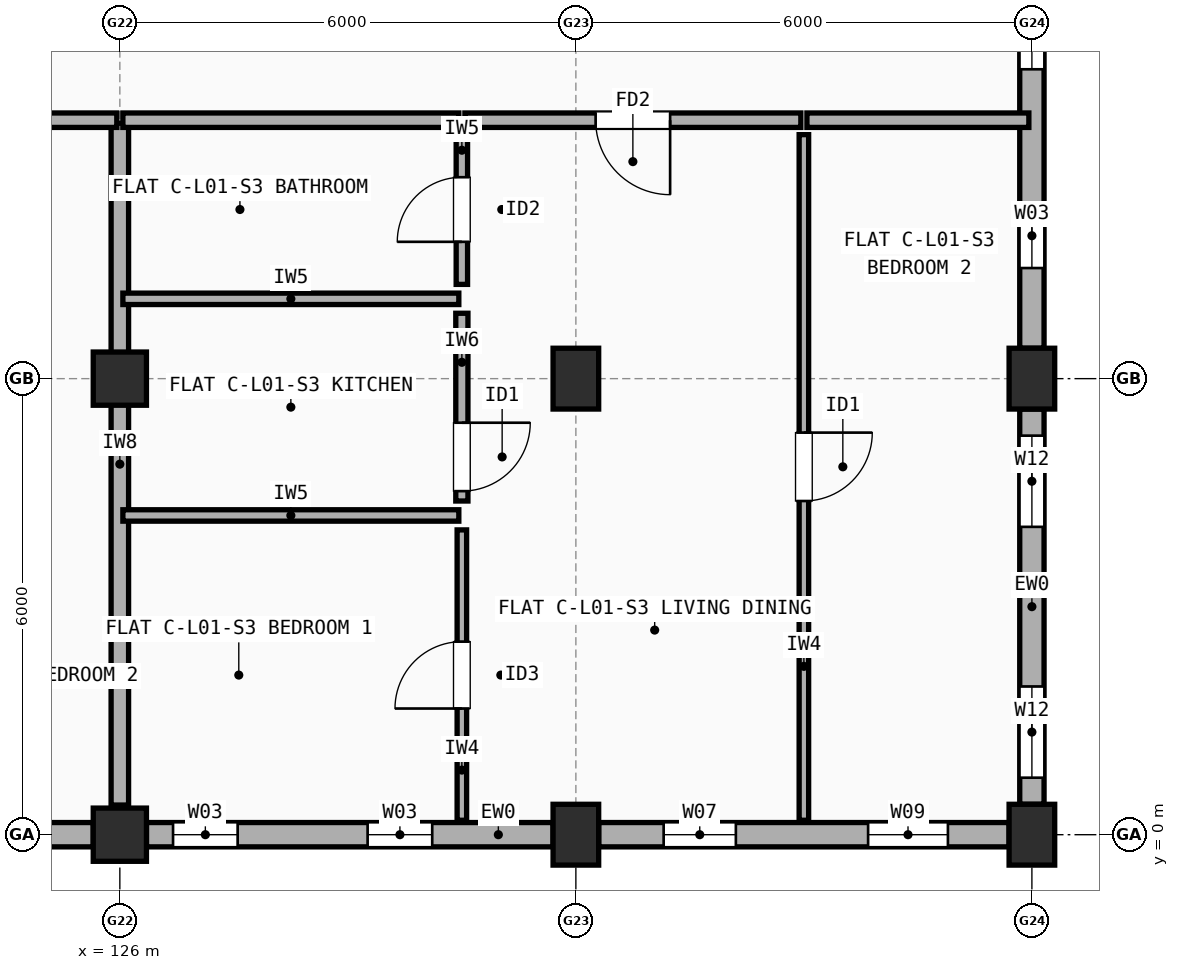
"""IFC4 building model, lengths in metres.
Left out: names, types, materials, properties, quantities, classifications, styles, units other than length and angle.
Written with IfcOpenShell. Run it as: python <this file> out.ifc"""

import sys

from ifc_helpers import new_model, si_unit, direction, frame, frame_2d, origin, origin_2d, place, context, subcontext, project, spatial, rectangle, extrude, element, fill, save


model = new_model("IFC4")
c1 = context("Model", 3, precision=1e-05, world=origin(), true_north=direction((0.0, 1.0)))
c2 = subcontext(c1, "Body", "Model", "MODEL_VIEW")
j1 = project(units=[si_unit("LENGTHUNIT", "METRE"), si_unit("PLANEANGLEUNIT", "RADIAN")], contexts=[c1])
p1 = place(None, origin())
s1 = spatial("IfcSite", under=j1, at=p1, CompositionType="ELEMENT")
p2 = place(p1, origin())
s2 = spatial("IfcBuilding", under=s1, at=p2, CompositionType="ELEMENT")
p3 = place(p2, frame((0.0, 0.0, 4.5)))
s3 = spatial("IfcBuildingStorey", under=s2, at=p3, CompositionType="ELEMENT", Elevation=4.5)
for number, where, z_axis, x_axis in (
    (1, (126.0, 0.0, 0.0), (0.0, 0.0, 1.0), (1.0, 0.0, 0.0)),
    (2, (126.0, 6.0, 0.0), (0.0, 0.0, 1.0), (1.0, 0.0, 0.0)),
):
    element("IfcColumn", number, at=place(p3, frame(where, z_axis=z_axis, x_axis=x_axis)), inside=s3, PredefinedType="COLUMN", context=c2, shape_type="SweptSolid", body=[
        extrude(rectangle(XDim=0.7, YDim=0.7, at=origin_2d()), origin(), (0.0, 0.0, 1.0), 2.945),
    ])
for number, where, z_axis, x_axis in (
    (3, (132.0, 0.0, 0.0), (0.0, 0.0, 1.0), (1.0, 0.0, 0.0)),
    (4, (132.0, 6.0, 0.0), (0.0, 0.0, 1.0), (1.0, 0.0, 0.0)),
    (5, (138.0, 0.0, 0.0), (0.0, 0.0, 1.0), (1.0, 0.0, 0.0)),
    (6, (138.0, 6.0, 0.0), (0.0, 0.0, 1.0), (1.0, 0.0, 0.0)),
):
    element("IfcColumn", number, at=place(p3, frame(where, z_axis=z_axis, x_axis=x_axis)), inside=s3, PredefinedType="COLUMN", context=c2, shape_type="SweptSolid", body=[
        extrude(rectangle(XDim=0.6, YDim=0.8, at=origin_2d()), origin(), (0.0, 0.0, 1.0), 2.945),
    ])
p4 = place(p3, frame((120.35, 0.0, 0.0), z_axis=(0.0, 0.0, 1.0), x_axis=(1.0, 0.0, 0.0)))
e7 = element("IfcWall", 7, at=p4, inside=s3, PredefinedType="STANDARD", context=c2, shape_type="SweptSolid", body=[
    extrude(rectangle(XDim=5.3, YDim=0.32, at=frame_2d((2.65, 0.0))), origin(), (0.0, 0.0, 1.0), 2.427),
])
p5 = place(p4, frame((0.705, 0.0, 0.9)))
e8 = element("IfcOpeningElement", 8, at=p5, cuts=e7, PredefinedType="OPENING", context=c2, shape_type="SweptSolid", body=[
    extrude(rectangle(XDim=1.2, YDim=1.35, at=frame_2d((0.6, 0.675))), frame((0.0, 0.17, 0.0), z_axis=(0.0, -1.0, 0.0), x_axis=(1.0, 0.0, 0.0)), (0.0, 0.0, 1.0), 0.34),
])
p6 = place(p4, frame((3.595, 0.0, 0.9)))
e9 = element("IfcOpeningElement", 9, at=p6, cuts=e7, PredefinedType="OPENING", context=c2, shape_type="SweptSolid", body=[
    extrude(rectangle(XDim=0.8, YDim=1.2, at=frame_2d((0.4, 0.6))), frame((0.0, 0.17, 0.0), z_axis=(0.0, -1.0, 0.0), x_axis=(1.0, 0.0, 0.0)), (0.0, 0.0, 1.0), 0.34),
])
p7 = place(p3, frame((126.35, 0.0, 0.0), z_axis=(0.0, 0.0, 1.0), x_axis=(1.0, 0.0, 0.0)))
e10 = element("IfcWall", 10, at=p7, inside=s3, PredefinedType="STANDARD", context=c2, shape_type="SweptSolid", body=[
    extrude(rectangle(XDim=5.35, YDim=0.32, at=frame_2d((2.675, 0.0))), origin(), (0.0, 0.0, 1.0), 2.427),
])
p8 = place(p7, frame((0.35, 0.0, 0.9)))
e11 = element("IfcOpeningElement", 11, at=p8, cuts=e10, PredefinedType="OPENING", context=c2, shape_type="SweptSolid", body=[
    extrude(rectangle(XDim=0.85, YDim=1.25, at=frame_2d((0.425, 0.625))), frame((0.0, 0.17, 0.0), z_axis=(0.0, -1.0, 0.0), x_axis=(1.0, 0.0, 0.0)), (0.0, 0.0, 1.0), 0.34),
])
p9 = place(p7, frame((2.91, 0.0, 0.9)))
e12 = element("IfcOpeningElement", 12, at=p9, cuts=e10, PredefinedType="OPENING", context=c2, shape_type="SweptSolid", body=[
    extrude(rectangle(XDim=0.85, YDim=1.25, at=frame_2d((0.425, 0.625))), frame((0.0, 0.17, 0.0), z_axis=(0.0, -1.0, 0.0), x_axis=(1.0, 0.0, 0.0)), (0.0, 0.0, 1.0), 0.34),
])
p10 = place(p3, frame((132.3, 0.0, 0.0), z_axis=(0.0, 0.0, 1.0), x_axis=(1.0, 0.0, 0.0)))
e13 = element("IfcWall", 13, at=p10, inside=s3, PredefinedType="STANDARD", context=c2, shape_type="SweptSolid", body=[
    extrude(rectangle(XDim=5.4, YDim=0.32, at=frame_2d((2.7, 0.0))), origin(), (0.0, 0.0, 1.0), 2.427),
])
p11 = place(p10, frame((0.855, 0.0, 0.9)))
e14 = element("IfcOpeningElement", 14, at=p11, cuts=e13, PredefinedType="OPENING", context=c2, shape_type="SweptSolid", body=[
    extrude(rectangle(XDim=0.95, YDim=1.35, at=frame_2d((0.475, 0.675))), frame((0.0, 0.17, 0.0), z_axis=(0.0, -1.0, 0.0), x_axis=(1.0, 0.0, 0.0)), (0.0, 0.0, 1.0), 0.34),
])
p12 = place(p10, frame((3.545, 0.0, 0.9)))
e15 = element("IfcOpeningElement", 15, at=p12, cuts=e13, PredefinedType="OPENING", context=c2, shape_type="SweptSolid", body=[
    extrude(rectangle(XDim=1.05, YDim=1.35, at=frame_2d((0.525, 0.675))), frame((0.0, 0.17, 0.0), z_axis=(0.0, -1.0, 0.0), x_axis=(1.0, 0.0, 0.0)), (0.0, 0.0, 1.0), 0.34),
])
p13 = place(p3, frame((138.0, 0.4, 0.0), z_axis=(0.0, 0.0, 1.0), x_axis=(0.0, 1.0, 0.0)))
e16 = element("IfcWall", 16, at=p13, inside=s3, PredefinedType="STANDARD", context=c2, shape_type="SweptSolid", body=[
    extrude(rectangle(XDim=5.2, YDim=0.32, at=frame_2d((2.6, 0.0))), origin(), (0.0, 0.0, 1.0), 2.427),
])
p14 = place(p13, frame((0.35, 0.0, 0.9)))
e17 = element("IfcOpeningElement", 17, at=p14, cuts=e16, PredefinedType="OPENING", context=c2, shape_type="SweptSolid", body=[
    extrude(rectangle(XDim=1.2, YDim=1.35, at=frame_2d((0.6, 0.675))), frame((0.0, 0.17, 0.0), z_axis=(0.0, -1.0, 0.0), x_axis=(1.0, 0.0, 0.0)), (0.0, 0.0, 1.0), 0.34),
])
p15 = place(p13, frame((3.65, 0.0, 0.9)))
e18 = element("IfcOpeningElement", 18, at=p15, cuts=e16, PredefinedType="OPENING", context=c2, shape_type="SweptSolid", body=[
    extrude(rectangle(XDim=1.2, YDim=1.35, at=frame_2d((0.6, 0.675))), frame((0.0, 0.17, 0.0), z_axis=(0.0, -1.0, 0.0), x_axis=(1.0, 0.0, 0.0)), (0.0, 0.0, 1.0), 0.34),
])
p16 = place(p3, frame((138.0, 6.4, 0.0), z_axis=(0.0, 0.0, 1.0), x_axis=(0.0, 1.0, 0.0)))
e19 = element("IfcWall", 19, at=p16, inside=s3, PredefinedType="STANDARD", context=c2, shape_type="SweptSolid", body=[
    extrude(rectangle(XDim=5.2, YDim=0.32, at=frame_2d((2.6, 0.0))), origin(), (0.0, 0.0, 1.0), 2.427),
])
p17 = place(p16, frame((1.055, 0.0, 0.9)))
e20 = element("IfcOpeningElement", 20, at=p17, cuts=e19, PredefinedType="OPENING", context=c2, shape_type="SweptSolid", body=[
    extrude(rectangle(XDim=0.85, YDim=1.25, at=frame_2d((0.425, 0.625))), frame((0.0, 0.17, 0.0), z_axis=(0.0, -1.0, 0.0), x_axis=(1.0, 0.0, 0.0)), (0.0, 0.0, 1.0), 0.34),
])
p18 = place(p16, frame((3.67, 0.0, 0.9)))
e21 = element("IfcOpeningElement", 21, at=p18, cuts=e19, PredefinedType="OPENING", context=c2, shape_type="SweptSolid", body=[
    extrude(rectangle(XDim=0.9, YDim=1.3, at=frame_2d((0.45, 0.65))), frame((0.0, 0.17, 0.0), z_axis=(0.0, -1.0, 0.0), x_axis=(1.0, 0.0, 0.0)), (0.0, 0.0, 1.0), 0.34),
])
p19 = place(p3, frame((126.0, 0.39, 0.0), z_axis=(0.0, 0.0, 1.0), x_axis=(0.0, 1.0, 0.0)))
e22 = element("IfcWall", 22, at=p19, inside=s3, PredefinedType="SOLIDWALL", context=c2, shape_type="SweptSolid", body=[
    extrude(rectangle(XDim=8.97, YDim=0.23, at=frame_2d((4.485, 0.0))), origin(), (0.0, 0.0, 1.0), 2.327),
])
p20 = place(p3, frame((123.04, 9.4, 0.0), z_axis=(0.0, 0.0, 1.0), x_axis=(1.0, 0.0, 0.0)))
e23 = element("IfcWall", 23, at=p20, inside=s3, PredefinedType="SOLIDWALL", context=c2, shape_type="SweptSolid", body=[
    extrude(rectangle(XDim=2.92, YDim=0.19, at=frame_2d((1.46, 0.0))), origin(), (0.0, 0.0, 1.0), 2.327),
])
p21 = place(p3, frame((126.04, 9.4, 0.0), z_axis=(0.0, 0.0, 1.0), x_axis=(1.0, 0.0, 0.0)))
e24 = element("IfcWall", 24, at=p21, inside=s3, PredefinedType="SOLIDWALL", context=c2, shape_type="SweptSolid", body=[
    extrude(rectangle(XDim=4.42, YDim=0.19, at=frame_2d((2.21, 0.0))), origin(), (0.0, 0.0, 1.0), 2.327),
])
p22 = place(p3, frame((130.54, 9.4, 0.0), z_axis=(0.0, 0.0, 1.0), x_axis=(1.0, 0.0, 0.0)))
e25 = element("IfcWall", 25, at=p22, inside=s3, PredefinedType="SOLIDWALL", context=c2, shape_type="SweptSolid", body=[
    extrude(rectangle(XDim=4.42, YDim=0.19, at=frame_2d((2.21, 0.0))), origin(), (0.0, 0.0, 1.0), 2.427),
])
p23 = place(p22, frame((1.72, 0.0, 0.0)))
e26 = element("IfcOpeningElement", 26, at=p23, cuts=e25, PredefinedType="OPENING", context=c2, shape_type="SweptSolid", body=[
    extrude(rectangle(XDim=0.98, YDim=2.15, at=frame_2d((0.49, 1.075))), frame((0.0, 0.105, 0.0), z_axis=(0.0, -1.0, 0.0), x_axis=(1.0, 0.0, 0.0)), (0.0, 0.0, 1.0), 0.21),
])
p24 = place(p3, frame((130.5, 0.19, 0.0), z_axis=(0.0, 0.0, 1.0), x_axis=(0.0, 1.0, 0.0)))
e27 = element("IfcWall", 27, at=p24, inside=s3, PredefinedType="PARTITIONING", context=c2, shape_type="SweptSolid", body=[
    extrude(rectangle(XDim=3.82, YDim=0.125, at=frame_2d((1.91, 0.0))), origin(), (0.0, 0.0, 1.0), 2.945),
])
p25 = place(p24, frame((1.47, 0.0, 0.0)))
e28 = element("IfcOpeningElement", 28, at=p25, cuts=e27, PredefinedType="OPENING", context=c2, shape_type="SweptSolid", body=[
    extrude(rectangle(XDim=0.88, YDim=2.1, at=frame_2d((0.44, 1.05))), frame((0.0, 0.073, 0.0), z_axis=(0.0, -1.0, 0.0), x_axis=(1.0, 0.0, 0.0)), (0.0, 0.0, 1.0), 0.145),
])
p26 = place(p3, frame((130.5, 4.39, 0.0), z_axis=(0.0, 0.0, 1.0), x_axis=(0.0, 1.0, 0.0)))
e29 = element("IfcWall", 29, at=p26, inside=s3, PredefinedType="PLUMBINGWALL", context=c2, shape_type="SweptSolid", body=[
    extrude(rectangle(XDim=2.47, YDim=0.16, at=frame_2d((1.235, 0.0))), origin(), (0.0, 0.0, 1.0), 2.427),
])
p27 = place(p26, frame((0.13, 0.0, 0.0)))
e30 = element("IfcOpeningElement", 30, at=p27, cuts=e29, PredefinedType="OPENING", context=c2, shape_type="SweptSolid", body=[
    extrude(rectangle(XDim=0.9, YDim=2.1, at=frame_2d((0.45, 1.05))), frame((0.0, 0.09, 0.0), z_axis=(0.0, -1.0, 0.0), x_axis=(1.0, 0.0, 0.0)), (0.0, 0.0, 1.0), 0.18),
])
p28 = place(p3, frame((130.5, 7.24, 0.0), z_axis=(0.0, 0.0, 1.0), x_axis=(0.0, 1.0, 0.0)))
e31 = element("IfcWall", 31, at=p28, inside=s3, PredefinedType="PARTITIONING", context=c2, shape_type="SweptSolid", body=[
    extrude(rectangle(XDim=1.97, YDim=0.15, at=frame_2d((0.985, 0.0))), origin(), (0.0, 0.0, 1.0), 2.945),
])
p29 = place(p28, frame((0.56, 0.0, 0.0)))
e32 = element("IfcOpeningElement", 32, at=p29, cuts=e31, PredefinedType="OPENING", context=c2, shape_type="SweptSolid", body=[
    extrude(rectangle(XDim=0.85, YDim=2.1, at=frame_2d((0.425, 1.05))), frame((0.0, 0.085, 0.0), z_axis=(0.0, -1.0, 0.0), x_axis=(1.0, 0.0, 0.0)), (0.0, 0.0, 1.0), 0.17),
])
for number, where, z_axis, x_axis in (
    (33, (126.04, 4.2, 0.0), (0.0, 0.0, 1.0), (1.0, 0.0, 0.0)),
    (34, (126.04, 7.05, 0.0), (0.0, 0.0, 1.0), (1.0, 0.0, 0.0)),
):
    element("IfcWall", number, at=place(p3, frame(where, z_axis=z_axis, x_axis=x_axis)), inside=s3, PredefinedType="PARTITIONING", context=c2, shape_type="SweptSolid", body=[
        extrude(rectangle(XDim=4.42, YDim=0.15, at=frame_2d((2.21, 0.0))), origin(), (0.0, 0.0, 1.0), 2.327),
    ])
p30 = place(p3, frame((135.04, 9.4, 0.0), z_axis=(0.0, 0.0, 1.0), x_axis=(1.0, 0.0, 0.0)))
e35 = element("IfcWall", 35, at=p30, inside=s3, PredefinedType="SOLIDWALL", context=c2, shape_type="SweptSolid", body=[
    extrude(rectangle(XDim=2.92, YDim=0.19, at=frame_2d((1.46, 0.0))), origin(), (0.0, 0.0, 1.0), 2.427),
])
p31 = place(p3, frame((135.0, 0.19, 0.0), z_axis=(0.0, 0.0, 1.0), x_axis=(0.0, 1.0, 0.0)))
e36 = element("IfcWall", 36, at=p31, inside=s3, PredefinedType="PARTITIONING", context=c2, shape_type="SweptSolid", body=[
    extrude(rectangle(XDim=9.02, YDim=0.125, at=frame_2d((4.51, 0.0))), origin(), (0.0, 0.0, 1.0), 2.427),
])
p32 = place(p31, frame((4.2, 0.0, 0.0)))
e37 = element("IfcOpeningElement", 37, at=p32, cuts=e36, PredefinedType="OPENING", context=c2, shape_type="SweptSolid", body=[
    extrude(rectangle(XDim=0.9, YDim=2.1, at=frame_2d((0.45, 1.05))), frame((0.0, 0.073, 0.0), z_axis=(0.0, -1.0, 0.0), x_axis=(1.0, 0.0, 0.0)), (0.0, 0.0, 1.0), 0.145),
])
p33 = place(p8, origin())
e38 = element("IfcWindow", 38, at=p33, inside=s3, PartitioningType="SINGLE_PANEL", PredefinedType="WINDOW", context=c2, shape_type="SweptSolid", body=[
    extrude(rectangle(XDim=0.85, YDim=1.25, at=frame_2d((0.425, 0.625))), frame((0.0, 0.03, 0.0), z_axis=(0.0, -1.0, 0.0), x_axis=(1.0, 0.0, 0.0)), (0.0, 0.0, 1.0), 0.06),
])
fill(e11, e38)
p34 = place(p9, origin())
e39 = element("IfcWindow", 39, at=p34, inside=s3, PartitioningType="SINGLE_PANEL", PredefinedType="WINDOW", context=c2, shape_type="SweptSolid", body=[
    extrude(rectangle(XDim=0.85, YDim=1.25, at=frame_2d((0.425, 0.625))), frame((0.0, 0.03, 0.0), z_axis=(0.0, -1.0, 0.0), x_axis=(1.0, 0.0, 0.0)), (0.0, 0.0, 1.0), 0.06),
])
fill(e12, e39)
p35 = place(p11, origin())
e40 = element("IfcWindow", 40, at=p35, inside=s3, PartitioningType="SINGLE_PANEL", PredefinedType="WINDOW", context=c2, shape_type="SweptSolid", body=[
    extrude(rectangle(XDim=0.95, YDim=1.35, at=frame_2d((0.475, 0.675))), frame((0.0, 0.03, 0.0), z_axis=(0.0, -1.0, 0.0), x_axis=(1.0, 0.0, 0.0)), (0.0, 0.0, 1.0), 0.06),
])
fill(e14, e40)
p36 = place(p12, origin())
e41 = element("IfcWindow", 41, at=p36, inside=s3, PartitioningType="SINGLE_PANEL", PredefinedType="WINDOW", context=c2, shape_type="SweptSolid", body=[
    extrude(rectangle(XDim=1.05, YDim=1.35, at=frame_2d((0.525, 0.675))), frame((0.0, 0.03, 0.0), z_axis=(0.0, -1.0, 0.0), x_axis=(1.0, 0.0, 0.0)), (0.0, 0.0, 1.0), 0.06),
])
fill(e15, e41)
p37 = place(p14, origin())
e42 = element("IfcWindow", 42, at=p37, inside=s3, PartitioningType="SINGLE_PANEL", PredefinedType="WINDOW", context=c2, shape_type="SweptSolid", body=[
    extrude(rectangle(XDim=1.2, YDim=1.35, at=frame_2d((0.6, 0.675))), frame((0.0, 0.03, 0.0), z_axis=(0.0, -1.0, 0.0), x_axis=(1.0, 0.0, 0.0)), (0.0, 0.0, 1.0), 0.06),
])
fill(e17, e42)
p38 = place(p15, origin())
e43 = element("IfcWindow", 43, at=p38, inside=s3, PartitioningType="SINGLE_PANEL", PredefinedType="WINDOW", context=c2, shape_type="SweptSolid", body=[
    extrude(rectangle(XDim=1.2, YDim=1.35, at=frame_2d((0.6, 0.675))), frame((0.0, 0.03, 0.0), z_axis=(0.0, -1.0, 0.0), x_axis=(1.0, 0.0, 0.0)), (0.0, 0.0, 1.0), 0.06),
])
fill(e18, e43)
p39 = place(p17, origin())
e44 = element("IfcWindow", 44, at=p39, inside=s3, PartitioningType="SINGLE_PANEL", PredefinedType="WINDOW", context=c2, shape_type="SweptSolid", body=[
    extrude(rectangle(XDim=0.85, YDim=1.25, at=frame_2d((0.425, 0.625))), frame((0.0, 0.03, 0.0), z_axis=(0.0, -1.0, 0.0), x_axis=(1.0, 0.0, 0.0)), (0.0, 0.0, 1.0), 0.06),
])
fill(e20, e44)
p40 = place(p18, origin())
e45 = element("IfcWindow", 45, at=p40, inside=s3, PartitioningType="SINGLE_PANEL", PredefinedType="WINDOW", context=c2, shape_type="SweptSolid", body=[
    extrude(rectangle(XDim=0.9, YDim=1.3, at=frame_2d((0.45, 0.65))), frame((0.0, 0.03, 0.0), z_axis=(0.0, -1.0, 0.0), x_axis=(1.0, 0.0, 0.0)), (0.0, 0.0, 1.0), 0.06),
])
fill(e21, e45)
p41 = place(p23, origin())
e46 = element("IfcDoor", 46, at=p41, inside=s3, OperationType="SINGLE_SWING_RIGHT", PredefinedType="DOOR", context=c2, shape_type="SweptSolid", body=[
    extrude(rectangle(XDim=0.98, YDim=2.15, at=frame_2d((0.49, 1.075))), frame((0.0, 0.025, 0.0), z_axis=(0.0, -1.0, 0.0), x_axis=(1.0, 0.0, 0.0)), (0.0, 0.0, 1.0), 0.05),
])
fill(e26, e46)
p42 = place(p25, origin())
e47 = element("IfcDoor", 47, at=p42, inside=s3, OperationType="SINGLE_SWING_LEFT", PredefinedType="DOOR", context=c2, shape_type="SweptSolid", body=[
    extrude(rectangle(XDim=0.88, YDim=2.1, at=frame_2d((0.44, 1.05))), frame((0.0, 0.025, 0.0), z_axis=(0.0, -1.0, 0.0), x_axis=(1.0, 0.0, 0.0)), (0.0, 0.0, 1.0), 0.05),
])
fill(e28, e47)
p43 = place(p27, origin())
e48 = element("IfcDoor", 48, at=p43, inside=s3, OperationType="SINGLE_SWING_RIGHT", PredefinedType="DOOR", context=c2, shape_type="SweptSolid", body=[
    extrude(rectangle(XDim=0.9, YDim=2.1, at=frame_2d((0.45, 1.05))), frame((0.0, 0.025, 0.0), z_axis=(0.0, -1.0, 0.0), x_axis=(1.0, 0.0, 0.0)), (0.0, 0.0, 1.0), 0.05),
])
fill(e30, e48)
p44 = place(p29, origin())
e49 = element("IfcDoor", 49, at=p44, inside=s3, OperationType="SINGLE_SWING_LEFT", PredefinedType="DOOR", context=c2, shape_type="SweptSolid", body=[
    extrude(rectangle(XDim=0.85, YDim=2.1, at=frame_2d((0.425, 1.05))), frame((0.0, 0.025, 0.0), z_axis=(0.0, -1.0, 0.0), x_axis=(1.0, 0.0, 0.0)), (0.0, 0.0, 1.0), 0.05),
])
fill(e32, e49)
p45 = place(p32, origin())
e50 = element("IfcDoor", 50, at=p45, inside=s3, OperationType="SINGLE_SWING_RIGHT", PredefinedType="DOOR", context=c2, shape_type="SweptSolid", body=[
    extrude(rectangle(XDim=0.9, YDim=2.1, at=frame_2d((0.45, 1.05))), frame((0.0, 0.025, 0.0), z_axis=(0.0, -1.0, 0.0), x_axis=(1.0, 0.0, 0.0)), (0.0, 0.0, 1.0), 0.05),
])
fill(e37, e50)
save(model, sys.argv[1])
